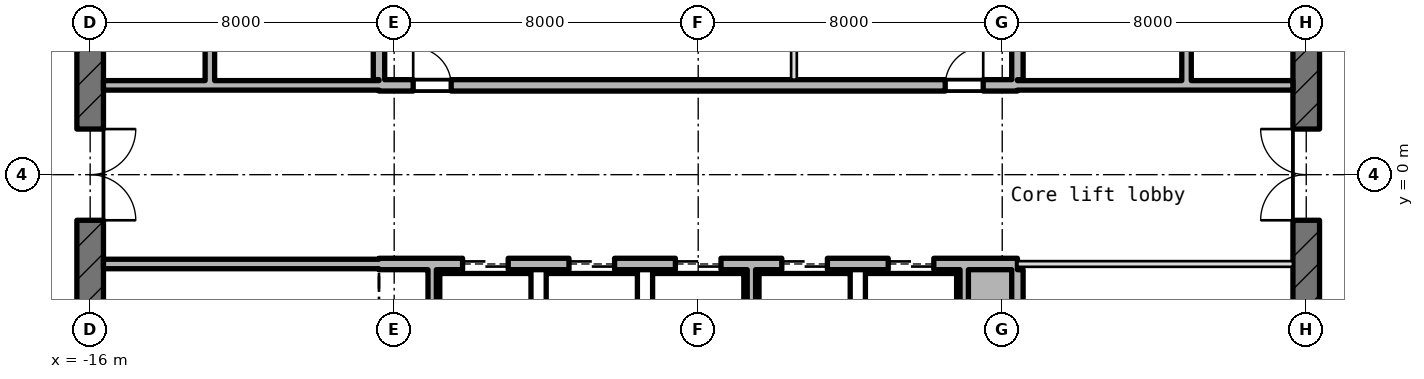
"""IFC4 building model, lengths in metres.
Left out: names, types, materials, properties, quantities, classifications, styles, units other than length and angle.
Written with IfcOpenShell. Run it as: python <this file> out.ifc"""

import sys

from ifc_helpers import new_model, si_unit, direction, frame, frame_2d, origin, place, context, subcontext, project, spatial, rectangle, extrude, element, fill, save


model = new_model("IFC4")
c1 = context("Model", 3, precision=1e-05, world=origin(), true_north=direction((0.0, 1.0)))
c2 = subcontext(c1, "Body", "Model", "MODEL_VIEW")
j1 = project(units=[si_unit("LENGTHUNIT", "METRE"), si_unit("PLANEANGLEUNIT", "RADIAN")], contexts=[c1])
p1 = place(None, origin())
s1 = spatial("IfcSite", under=j1, at=p1, CompositionType="ELEMENT")
p2 = place(p1, origin())
s2 = spatial("IfcBuilding", under=s1, at=p2, CompositionType="ELEMENT")
p3 = place(p2, frame((0.0, 0.0, 334.3)))
s3 = spatial("IfcBuildingStorey", under=s2, at=p3, CompositionType="ELEMENT", Elevation=334.3)
p4 = place(p3, frame((16.0, -10.145, -0.18), z_axis=(0.0, 0.0, 1.0), x_axis=(0.0, 1.0, 0.0)))
e1 = element("IfcWall", 1, at=p4, inside=s3, PredefinedType="SHEAR", context=c2, shape_type="SweptSolid", body=[
    extrude(rectangle(XDim=20.29, YDim=0.7, at=frame_2d((10.145, 0.0))), origin(), (0.0, 0.0, 1.0), 4.15),
])
p5 = place(p4, frame((8.945, 0.0, 0.18)))
e2 = element("IfcOpeningElement", 2, at=p5, cuts=e1, PredefinedType="OPENING", context=c2, shape_type="SweptSolid", body=[
    extrude(rectangle(XDim=2.4, YDim=2.1, at=frame_2d((1.2, 1.05))), frame((0.0, 0.36, 0.0), z_axis=(0.0, -1.0, 0.0), x_axis=(1.0, 0.0, 0.0)), (0.0, 0.0, 1.0), 0.72),
])
p6 = place(p4, frame((13.545, 0.0, 0.18)))
e3 = element("IfcOpeningElement", 3, at=p6, cuts=e1, PredefinedType="OPENING", context=c2, shape_type="SweptSolid", body=[
    extrude(rectangle(XDim=1.2, YDim=2.1, at=frame_2d((0.6, 1.05))), frame((0.0, 0.36, 0.0), z_axis=(0.0, -1.0, 0.0), x_axis=(1.0, 0.0, 0.0)), (0.0, 0.0, 1.0), 0.72),
])
p7 = place(p4, frame((2.4, 0.0, 0.18)))
e4 = element("IfcOpeningElement", 4, at=p7, cuts=e1, PredefinedType="OPENING", context=c2, shape_type="SweptSolid", body=[
    extrude(rectangle(XDim=1.2, YDim=2.1, at=frame_2d((0.6, 1.05))), frame((0.0, 0.36, 0.0), z_axis=(0.0, -1.0, 0.0), x_axis=(1.0, 0.0, 0.0)), (0.0, 0.0, 1.0), 0.72),
])
p8 = place(p3, frame((-16.0, 10.145, -0.18), z_axis=(0.0, 0.0, 1.0), x_axis=(0.0, -1.0, 0.0)))
e5 = element("IfcWall", 5, at=p8, inside=s3, PredefinedType="SHEAR", context=c2, shape_type="SweptSolid", body=[
    extrude(rectangle(XDim=20.29, YDim=0.7, at=frame_2d((10.145, 0.0))), origin(), (0.0, 0.0, 1.0), 4.15),
])
p9 = place(p8, frame((8.945, 0.0, 0.18)))
e6 = element("IfcOpeningElement", 6, at=p9, cuts=e5, PredefinedType="OPENING", context=c2, shape_type="SweptSolid", body=[
    extrude(rectangle(XDim=2.4, YDim=2.1, at=frame_2d((1.2, 1.05))), frame((0.0, 0.36, 0.0), z_axis=(0.0, -1.0, 0.0), x_axis=(1.0, 0.0, 0.0)), (0.0, 0.0, 1.0), 0.72),
])
p10 = place(p8, frame((5.545, 0.0, 0.18)))
e7 = element("IfcOpeningElement", 7, at=p10, cuts=e5, PredefinedType="OPENING", context=c2, shape_type="SweptSolid", body=[
    extrude(rectangle(XDim=1.2, YDim=2.1, at=frame_2d((0.6, 1.05))), frame((0.0, 0.36, 0.0), z_axis=(0.0, -1.0, 0.0), x_axis=(1.0, 0.0, 0.0)), (0.0, 0.0, 1.0), 0.72),
])
p11 = place(p3, frame((-15.65, -2.35, 0.0), z_axis=(0.0, 0.0, 1.0), x_axis=(1.0, 0.0, 0.0)))
e8 = element("IfcWall", 8, at=p11, inside=s3, PredefinedType="STANDARD", context=c2, shape_type="SweptSolid", body=[
    extrude(rectangle(XDim=7.25, YDim=0.25, at=frame_2d((3.625, 0.0))), origin(), (0.0, 0.0, 1.0), 3.97),
])
p12 = place(p3, frame((-8.4, -2.35, -0.18), z_axis=(0.0, 0.0, 1.0), x_axis=(1.0, 0.0, 0.0)))
e9 = element("IfcWall", 9, at=p12, inside=s3, PredefinedType="SHEAR", context=c2, shape_type="SweptSolid", body=[
    extrude(rectangle(XDim=16.8, YDim=0.3, at=frame_2d((8.4, 0.0))), origin(), (0.0, 0.0, 1.0), 4.15),
])
p13 = place(p12, frame((2.2, 0.0, 0.18)))
e10 = element("IfcOpeningElement", 10, at=p13, cuts=e9, PredefinedType="OPENING", context=c2, shape_type="SweptSolid", body=[
    extrude(rectangle(XDim=1.2, YDim=2.1, at=frame_2d((0.6, 1.05))), frame((0.0, 0.16, 0.0), z_axis=(0.0, -1.0, 0.0), x_axis=(1.0, 0.0, 0.0)), (0.0, 0.0, 1.0), 0.32),
])
p14 = place(p12, frame((5.0, 0.0, 0.18)))
e11 = element("IfcOpeningElement", 11, at=p14, cuts=e9, PredefinedType="OPENING", context=c2, shape_type="SweptSolid", body=[
    extrude(rectangle(XDim=1.2, YDim=2.1, at=frame_2d((0.6, 1.05))), frame((0.0, 0.16, 0.0), z_axis=(0.0, -1.0, 0.0), x_axis=(1.0, 0.0, 0.0)), (0.0, 0.0, 1.0), 0.32),
])
p15 = place(p12, frame((7.8, 0.0, 0.18)))
e12 = element("IfcOpeningElement", 12, at=p15, cuts=e9, PredefinedType="OPENING", context=c2, shape_type="SweptSolid", body=[
    extrude(rectangle(XDim=1.2, YDim=2.1, at=frame_2d((0.6, 1.05))), frame((0.0, 0.16, 0.0), z_axis=(0.0, -1.0, 0.0), x_axis=(1.0, 0.0, 0.0)), (0.0, 0.0, 1.0), 0.32),
])
p16 = place(p12, frame((10.6, 0.0, 0.18)))
e13 = element("IfcOpeningElement", 13, at=p16, cuts=e9, PredefinedType="OPENING", context=c2, shape_type="SweptSolid", body=[
    extrude(rectangle(XDim=1.2, YDim=2.1, at=frame_2d((0.6, 1.05))), frame((0.0, 0.16, 0.0), z_axis=(0.0, -1.0, 0.0), x_axis=(1.0, 0.0, 0.0)), (0.0, 0.0, 1.0), 0.32),
])
p17 = place(p12, frame((13.4, 0.0, 0.18)))
e14 = element("IfcOpeningElement", 14, at=p17, cuts=e9, PredefinedType="OPENING", context=c2, shape_type="SweptSolid", body=[
    extrude(rectangle(XDim=1.2, YDim=2.1, at=frame_2d((0.6, 1.05))), frame((0.0, 0.16, 0.0), z_axis=(0.0, -1.0, 0.0), x_axis=(1.0, 0.0, 0.0)), (0.0, 0.0, 1.0), 0.32),
])
p18 = place(p3, frame((8.4, -2.35, 0.0), z_axis=(0.0, 0.0, 1.0), x_axis=(1.0, 0.0, 0.0)))
e15 = element("IfcWall", 15, at=p18, inside=s3, PredefinedType="PARTITIONING", context=c2, shape_type="SweptSolid", body=[
    extrude(rectangle(XDim=7.25, YDim=0.15, at=frame_2d((3.625, 0.0))), origin(), (0.0, 0.0, 1.0), 3.97),
])
p19 = place(p3, frame((-15.65, 2.35, 0.0), z_axis=(0.0, 0.0, 1.0), x_axis=(1.0, 0.0, 0.0)))
e16 = element("IfcWall", 16, at=p19, inside=s3, PredefinedType="STANDARD", context=c2, shape_type="SweptSolid", body=[
    extrude(rectangle(XDim=7.25, YDim=0.25, at=frame_2d((3.625, 0.0))), origin(), (0.0, 0.0, 1.0), 3.97),
])
p20 = place(p3, frame((-8.4, 2.35, -0.18), z_axis=(0.0, 0.0, 1.0), x_axis=(1.0, 0.0, 0.0)))
e17 = element("IfcWall", 17, at=p20, inside=s3, PredefinedType="SHEAR", context=c2, shape_type="SweptSolid", body=[
    extrude(rectangle(XDim=16.8, YDim=0.3, at=frame_2d((8.4, 0.0))), origin(), (0.0, 0.0, 1.0), 4.15),
])
p21 = place(p20, frame((0.9, 0.0, 0.18)))
e18 = element("IfcOpeningElement", 18, at=p21, cuts=e17, PredefinedType="OPENING", context=c2, shape_type="SweptSolid", body=[
    extrude(rectangle(XDim=1.0, YDim=2.1, at=frame_2d((0.5, 1.05))), frame((0.0, 0.16, 0.0), z_axis=(0.0, -1.0, 0.0), x_axis=(1.0, 0.0, 0.0)), (0.0, 0.0, 1.0), 0.32),
])
p22 = place(p20, frame((14.9, 0.0, 0.18)))
e19 = element("IfcOpeningElement", 19, at=p22, cuts=e17, PredefinedType="OPENING", context=c2, shape_type="SweptSolid", body=[
    extrude(rectangle(XDim=1.0, YDim=2.1, at=frame_2d((0.5, 1.05))), frame((0.0, 0.16, 0.0), z_axis=(0.0, -1.0, 0.0), x_axis=(1.0, 0.0, 0.0)), (0.0, 0.0, 1.0), 0.32),
])
p23 = place(p3, frame((8.4, 2.35, 0.0), z_axis=(0.0, 0.0, 1.0), x_axis=(1.0, 0.0, 0.0)))
e20 = element("IfcWall", 20, at=p23, inside=s3, PredefinedType="STANDARD", context=c2, shape_type="SweptSolid", body=[
    extrude(rectangle(XDim=7.25, YDim=0.25, at=frame_2d((3.625, 0.0))), origin(), (0.0, 0.0, 1.0), 3.97),
])
p24 = place(p3, frame((-12.85, 2.475, 0.0), z_axis=(0.0, 0.0, 1.0), x_axis=(0.0, 1.0, 0.0)))
e21 = element("IfcWall", 21, at=p24, inside=s3, PredefinedType="STANDARD", context=c2, shape_type="SweptSolid", body=[
    extrude(rectangle(XDim=3.05, YDim=0.25, at=frame_2d((1.525, 0.0))), origin(), (0.0, 0.0, 1.0), 3.97),
])
p25 = place(p3, frame((-8.4, 2.5, -0.18), z_axis=(0.0, 0.0, 1.0), x_axis=(0.0, 1.0, 0.0)))
e22 = element("IfcWall", 22, at=p25, inside=s3, PredefinedType="SHEAR", context=c2, shape_type="SweptSolid", body=[
    extrude(rectangle(XDim=5.85, YDim=0.3, at=frame_2d((2.925, 0.0))), origin(), (0.0, 0.0, 1.0), 4.15),
])
for number, where, z_axis, x_axis in (
    (23, (-7.0, -5.24, 0.0), (0.0, 0.0, 1.0), (0.0, 1.0, 0.0)),
    (24, (1.4, -5.24, 0.0), (0.0, 0.0, 1.0), (0.0, 1.0, 0.0)),
):
    element("IfcWall", number, at=place(p3, frame(where, z_axis=z_axis, x_axis=x_axis)), inside=s3, PredefinedType="STANDARD", context=c2, shape_type="SweptSolid", body=[
        extrude(rectangle(XDim=2.74, YDim=0.22, at=frame_2d((1.37, 0.0))), origin(), (0.0, 0.0, 1.0), 3.97),
    ])
p26 = place(p3, frame((2.52, 2.5, 0.0), z_axis=(0.0, 0.0, 1.0), x_axis=(0.0, 1.0, 0.0)))
e25 = element("IfcWall", 25, at=p26, inside=s3, PredefinedType="PARTITIONING", context=c2, shape_type="SweptSolid", body=[
    extrude(rectangle(XDim=2.775, YDim=0.15, at=frame_2d((1.387, 0.0))), origin(), (0.0, 0.0, 1.0), 3.97),
])
p27 = place(p3, frame((7.0, -5.24, 0.0), z_axis=(0.0, 0.0, 1.0), x_axis=(0.0, 1.0, 0.0)))
e26 = element("IfcWall", 26, at=p27, inside=s3, PredefinedType="STANDARD", context=c2, shape_type="SweptSolid", body=[
    extrude(rectangle(XDim=2.74, YDim=0.22, at=frame_2d((1.37, 0.0))), origin(), (0.0, 0.0, 1.0), 3.97),
])
for number, where, z_axis, x_axis in (
    (27, (8.4, -8.35, -0.18), (0.0, 0.0, 1.0), (0.0, 1.0, 0.0)),
    (28, (8.4, 2.5, -0.18), (0.0, 0.0, 1.0), (0.0, 1.0, 0.0)),
):
    element("IfcWall", number, at=place(p3, frame(where, z_axis=z_axis, x_axis=x_axis)), inside=s3, PredefinedType="SHEAR", context=c2, shape_type="SweptSolid", body=[
        extrude(rectangle(XDim=5.85, YDim=0.3, at=frame_2d((2.925, 0.0))), origin(), (0.0, 0.0, 1.0), 4.15),
    ])
p28 = place(p3, frame((12.85, 2.475, 0.0), z_axis=(0.0, 0.0, 1.0), x_axis=(0.0, 1.0, 0.0)))
e29 = element("IfcWall", 29, at=p28, inside=s3, PredefinedType="STANDARD", context=c2, shape_type="SweptSolid", body=[
    extrude(rectangle(XDim=3.05, YDim=0.25, at=frame_2d((1.525, 0.0))), origin(), (0.0, 0.0, 1.0), 3.97),
])
p29 = place(p13, origin())
e30 = element("IfcDoor", 30, at=p29, inside=s3, OperationType="DOUBLE_DOOR_SLIDING", PredefinedType="DOOR", context=c2, shape_type="SweptSolid", body=[
    extrude(rectangle(XDim=1.2, YDim=2.1, at=frame_2d((0.6, 1.05))), frame((0.0, 0.025, 0.0), z_axis=(0.0, -1.0, 0.0), x_axis=(1.0, 0.0, 0.0)), (0.0, 0.0, 1.0), 0.05),
])
fill(e10, e30)
p30 = place(p14, origin())
e31 = element("IfcDoor", 31, at=p30, inside=s3, OperationType="DOUBLE_DOOR_SLIDING", PredefinedType="DOOR", context=c2, shape_type="SweptSolid", body=[
    extrude(rectangle(XDim=1.2, YDim=2.1, at=frame_2d((0.6, 1.05))), frame((0.0, 0.025, 0.0), z_axis=(0.0, -1.0, 0.0), x_axis=(1.0, 0.0, 0.0)), (0.0, 0.0, 1.0), 0.05),
])
fill(e11, e31)
p31 = place(p15, origin())
e32 = element("IfcDoor", 32, at=p31, inside=s3, OperationType="DOUBLE_DOOR_SLIDING", PredefinedType="DOOR", context=c2, shape_type="SweptSolid", body=[
    extrude(rectangle(XDim=1.2, YDim=2.1, at=frame_2d((0.6, 1.05))), frame((0.0, 0.025, 0.0), z_axis=(0.0, -1.0, 0.0), x_axis=(1.0, 0.0, 0.0)), (0.0, 0.0, 1.0), 0.05),
])
fill(e12, e32)
p32 = place(p16, origin())
e33 = element("IfcDoor", 33, at=p32, inside=s3, OperationType="DOUBLE_DOOR_SLIDING", PredefinedType="DOOR", context=c2, shape_type="SweptSolid", body=[
    extrude(rectangle(XDim=1.2, YDim=2.1, at=frame_2d((0.6, 1.05))), frame((0.0, 0.025, 0.0), z_axis=(0.0, -1.0, 0.0), x_axis=(1.0, 0.0, 0.0)), (0.0, 0.0, 1.0), 0.05),
])
fill(e13, e33)
p33 = place(p17, origin())
e34 = element("IfcDoor", 34, at=p33, inside=s3, OperationType="DOUBLE_DOOR_SLIDING", PredefinedType="DOOR", context=c2, shape_type="SweptSolid", body=[
    extrude(rectangle(XDim=1.2, YDim=2.1, at=frame_2d((0.6, 1.05))), frame((0.0, 0.025, 0.0), z_axis=(0.0, -1.0, 0.0), x_axis=(1.0, 0.0, 0.0)), (0.0, 0.0, 1.0), 0.05),
])
fill(e14, e34)
p34 = place(p9, origin())
e35 = element("IfcDoor", 35, at=p34, inside=s3, OperationType="DOUBLE_DOOR_SINGLE_SWING", PredefinedType="DOOR", context=c2, shape_type="SweptSolid", body=[
    extrude(rectangle(XDim=2.4, YDim=2.1, at=frame_2d((1.2, 1.05))), frame((0.0, 0.025, 0.0), z_axis=(0.0, -1.0, 0.0), x_axis=(1.0, 0.0, 0.0)), (0.0, 0.0, 1.0), 0.05),
])
fill(e6, e35)
p35 = place(p5, origin())
e36 = element("IfcDoor", 36, at=p35, inside=s3, OperationType="DOUBLE_DOOR_SINGLE_SWING", PredefinedType="DOOR", context=c2, shape_type="SweptSolid", body=[
    extrude(rectangle(XDim=2.4, YDim=2.1, at=frame_2d((1.2, 1.05))), frame((0.0, 0.025, 0.0), z_axis=(0.0, -1.0, 0.0), x_axis=(1.0, 0.0, 0.0)), (0.0, 0.0, 1.0), 0.05),
])
fill(e2, e36)
p36 = place(p21, origin())
e37 = element("IfcDoor", 37, at=p36, inside=s3, OperationType="SINGLE_SWING_RIGHT", PredefinedType="DOOR", context=c2, shape_type="SweptSolid", body=[
    extrude(rectangle(XDim=1.0, YDim=2.1, at=frame_2d((0.5, 1.05))), frame((0.0, 0.025, 0.0), z_axis=(0.0, -1.0, 0.0), x_axis=(1.0, 0.0, 0.0)), (0.0, 0.0, 1.0), 0.05),
])
fill(e18, e37)
p37 = place(p22, origin())
e38 = element("IfcDoor", 38, at=p37, inside=s3, OperationType="SINGLE_SWING_RIGHT", PredefinedType="DOOR", context=c2, shape_type="SweptSolid", body=[
    extrude(rectangle(XDim=1.0, YDim=2.1, at=frame_2d((0.5, 1.05))), frame((0.0, 0.025, 0.0), z_axis=(0.0, -1.0, 0.0), x_axis=(1.0, 0.0, 0.0)), (0.0, 0.0, 1.0), 0.05),
])
fill(e19, e38)
save(model, sys.argv[1])
